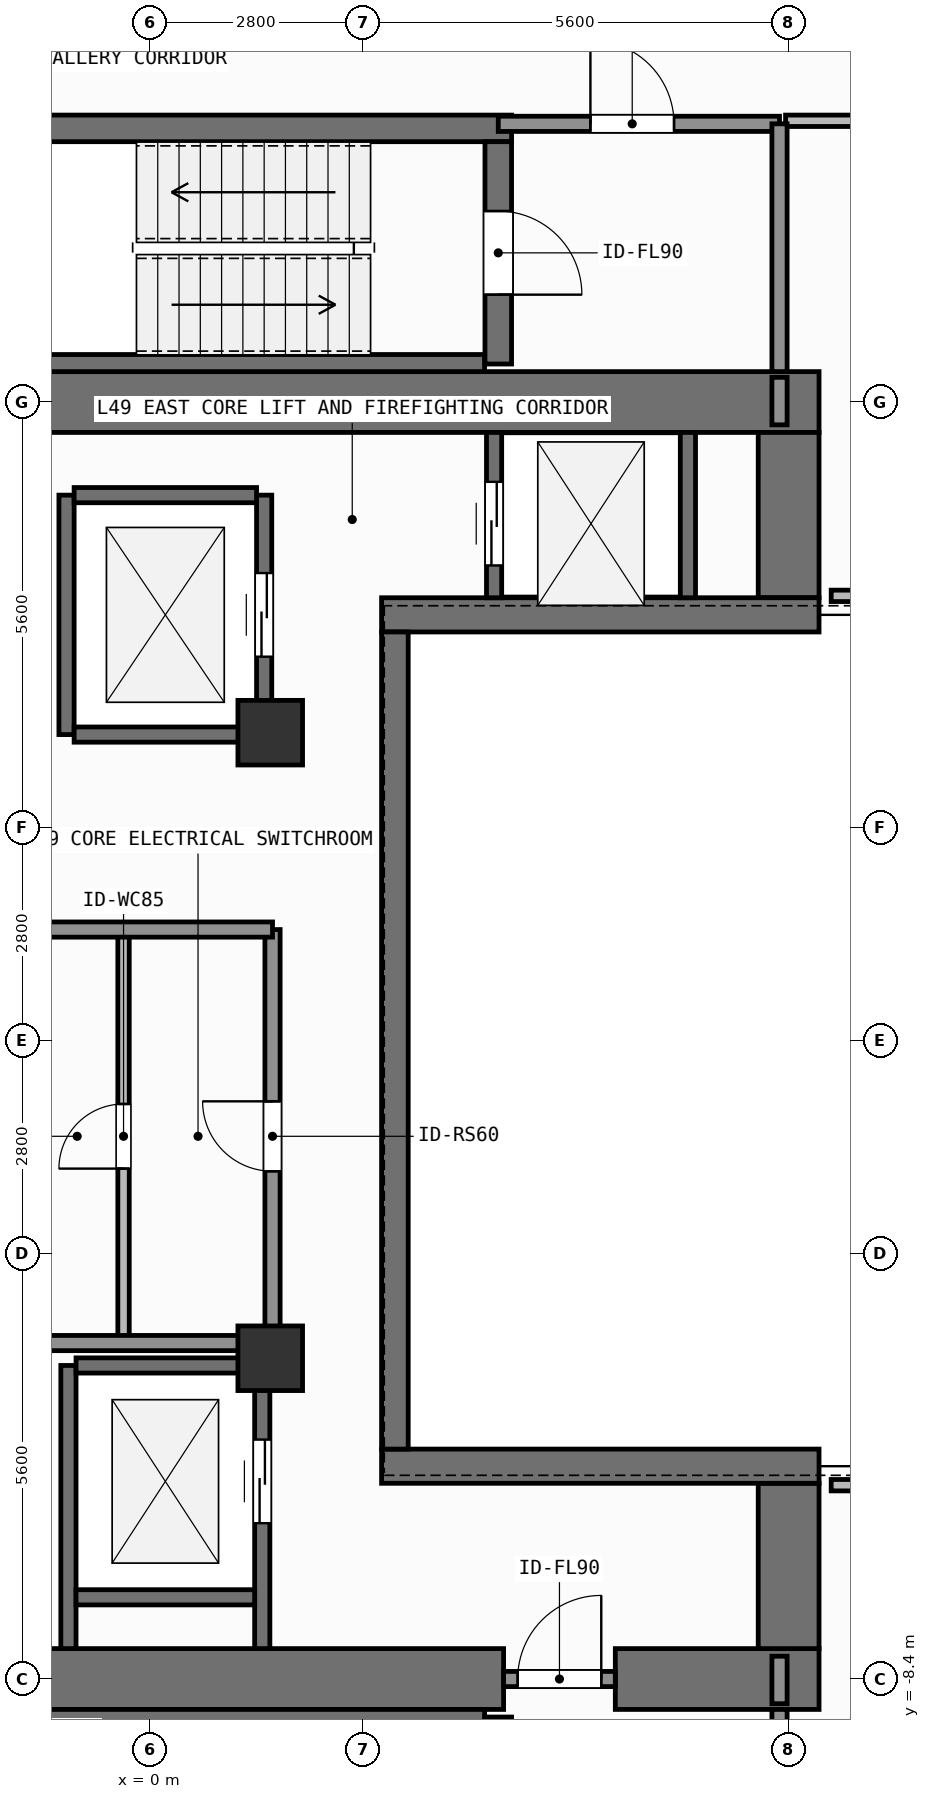
"""IFC4 building model, lengths in metres.
Left out: names, types, materials, properties, quantities, classifications, styles, units other than length and angle.
Written with IfcOpenShell. Run it as: python <this file> out.ifc"""

import sys

from ifc_helpers import new_model, si_unit, direction, frame, frame_2d, origin, origin_2d, place, context, subcontext, project, spatial, rectangle, extrude, element, fill, save


model = new_model("IFC4")
c1 = context("Model", 3, precision=1e-05, world=origin(), true_north=direction((0.0, 1.0)))
c2 = subcontext(c1, "Body", "Model", "MODEL_VIEW")
j1 = project(units=[si_unit("LENGTHUNIT", "METRE"), si_unit("PLANEANGLEUNIT", "RADIAN")], contexts=[c1])
p1 = place(None, origin())
s1 = spatial("IfcSite", under=j1, at=p1, CompositionType="ELEMENT")
p2 = place(p1, origin())
s2 = spatial("IfcBuilding", under=s1, at=p2, CompositionType="ELEMENT")
p3 = place(p2, frame((0.0, 0.0, 199.2)))
s3 = spatial("IfcBuildingStorey", under=s2, at=p3, CompositionType="ELEMENT", Elevation=199.2)
p4 = place(p3, frame((-2.62, -8.4, 0.0), z_axis=(0.0, 0.0, 1.0), x_axis=(1.0, 0.0, 0.0)))
e1 = element("IfcWall", 1, at=p4, inside=s3, PredefinedType="SHEAR", context=c2, shape_type="SweptSolid", body=[
    extrude(rectangle(XDim=7.27, YDim=0.8, at=frame_2d((3.635, 0.0))), origin(), (0.0, 0.0, 1.0), 3.9),
])
p5 = place(p3, frame((6.12, -8.4, 0.0), z_axis=(0.0, 0.0, 1.0), x_axis=(1.0, 0.0, 0.0)))
e2 = element("IfcWall", 2, at=p5, inside=s3, PredefinedType="SHEAR", context=c2, shape_type="SweptSolid", body=[
    extrude(rectangle(XDim=2.68, YDim=0.8, at=frame_2d((1.34, 0.0))), origin(), (0.0, 0.0, 1.0), 3.9),
])
p6 = place(p3, frame((-7.55, 8.4, 0.0), z_axis=(0.0, 0.0, 1.0), x_axis=(1.0, 0.0, 0.0)))
e3 = element("IfcWall", 3, at=p6, inside=s3, PredefinedType="SHEAR", context=c2, shape_type="SweptSolid", body=[
    extrude(rectangle(XDim=16.35, YDim=0.8, at=frame_2d((8.175, 0.0))), origin(), (0.0, 0.0, 1.0), 3.9),
])
for number, where, z_axis, x_axis in (
    (4, (8.4, -8.0, 0.0), (0.0, 0.0, 1.0), (0.0, 1.0, 0.0)),
    (5, (8.4, 5.825, 0.0), (0.0, 0.0, 1.0), (0.0, 1.0, 0.0)),
):
    element("IfcWall", number, at=place(p3, frame(where, z_axis=z_axis, x_axis=x_axis)), inside=s3, PredefinedType="SHEAR", context=c2, shape_type="SweptSolid", body=[
        extrude(rectangle(XDim=2.175, YDim=0.8, at=frame_2d((1.087, 0.0))), origin(), (0.0, 0.0, 1.0), 3.9),
    ])
for number, where, z_axis, x_axis in (
    (6, (3.045, -5.6, 0.0), (0.0, 0.0, 1.0), (1.0, 0.0, 0.0)),
    (7, (3.045, 5.6, 0.0), (0.0, 0.0, 1.0), (1.0, 0.0, 0.0)),
):
    element("IfcWall", number, at=place(p3, frame(where, z_axis=z_axis, x_axis=x_axis)), inside=s3, PredefinedType="SHEAR", context=c2, shape_type="SweptSolid", body=[
        extrude(rectangle(XDim=5.755, YDim=0.45, at=frame_2d((2.877, 0.0))), origin(), (0.0, 0.0, 1.0), 3.9),
    ])
p7 = place(p3, frame((3.22, -5.375, 0.0), z_axis=(0.0, 0.0, 1.0), x_axis=(0.0, 1.0, 0.0)))
e8 = element("IfcWall", 8, at=p7, inside=s3, PredefinedType="SHEAR", context=c2, shape_type="SweptSolid", body=[
    extrude(rectangle(XDim=10.75, YDim=0.35, at=frame_2d((5.375, 0.0))), origin(), (0.0, 0.0, 1.0), 3.9),
])
p8 = place(p3, frame((-2.2, -8.913, 0.0), z_axis=(0.0, 0.0, 1.0), x_axis=(1.0, 0.0, 0.0)))
e9 = element("IfcWall", 9, at=p8, inside=s3, PredefinedType="SHEAR", context=c2, shape_type="SweptSolid", body=[
    extrude(rectangle(XDim=6.6, YDim=0.225, at=frame_2d((3.3, 0.0))), origin(), (0.0, 0.0, 1.0), 3.9),
])
p9 = place(p3, frame((4.58, -8.9, 0.0), z_axis=(0.0, 0.0, 1.0), x_axis=(0.0, -1.0, 0.0)))
e10 = element("IfcWall", 10, at=p9, inside=s3, PredefinedType="SHEAR", context=c2, shape_type="SweptSolid", body=[
    extrude(rectangle(XDim=2.925, YDim=0.35, at=frame_2d((1.462, 0.0))), origin(), (0.0, 0.0, 1.0), 3.9),
])
p10 = place(p9, frame((0.913, 0.0, 0.0)))
e11 = element("IfcOpeningElement", 11, at=p10, cuts=e10, PredefinedType="OPENING", context=c2, shape_type="SweptSolid", body=[
    extrude(rectangle(XDim=1.1, YDim=2.15, at=frame_2d((0.55, 1.075))), frame((0.0, 0.185, 0.0), z_axis=(0.0, -1.0, 0.0), x_axis=(1.0, 0.0, 0.0)), (0.0, 0.0, 1.0), 0.37),
])
p11 = place(p3, frame((-2.555, 12.0, 0.0), z_axis=(0.0, 0.0, 1.0), x_axis=(1.0, 0.0, 0.0)))
e12 = element("IfcWall", 12, at=p11, inside=s3, PredefinedType="SHEAR", context=c2, shape_type="SweptSolid", body=[
    extrude(rectangle(XDim=7.31, YDim=0.35, at=frame_2d((3.655, 0.0))), origin(), (0.0, 0.0, 1.0), 3.9),
])
p12 = place(p3, frame((-2.2, 8.913, 0.0), z_axis=(0.0, 0.0, 1.0), x_axis=(1.0, 0.0, 0.0)))
e13 = element("IfcWall", 13, at=p12, inside=s3, PredefinedType="SHEAR", context=c2, shape_type="SweptSolid", body=[
    extrude(rectangle(XDim=6.6, YDim=0.225, at=frame_2d((3.3, 0.0))), origin(), (0.0, 0.0, 1.0), 3.9),
])
p13 = place(p3, frame((4.58, 11.825, 0.0), z_axis=(0.0, 0.0, 1.0), x_axis=(0.0, -1.0, 0.0)))
e14 = element("IfcWall", 14, at=p13, inside=s3, PredefinedType="SHEAR", context=c2, shape_type="SweptSolid", body=[
    extrude(rectangle(XDim=2.925, YDim=0.35, at=frame_2d((1.462, 0.0))), origin(), (0.0, 0.0, 1.0), 3.9),
])
p14 = place(p13, frame((0.913, 0.0, 0.0)))
e15 = element("IfcOpeningElement", 15, at=p14, cuts=e14, PredefinedType="OPENING", context=c2, shape_type="SweptSolid", body=[
    extrude(rectangle(XDim=1.1, YDim=2.15, at=frame_2d((0.55, 1.075))), frame((0.0, 0.185, 0.0), z_axis=(0.0, -1.0, 0.0), x_axis=(1.0, 0.0, 0.0)), (0.0, 0.0, 1.0), 0.37),
])
for number, where, z_axis, x_axis in (
    (16, (1.58, -4.18, 0.0), (0.0, 0.0, 1.0), (1.0, 0.0, 0.0)),
    (17, (1.58, 4.05, 0.0), (0.0, 0.0, 1.0), (1.0, 0.0, 0.0)),
):
    element("IfcColumn", number, at=place(p3, frame(where, z_axis=z_axis, x_axis=x_axis)), inside=s3, PredefinedType="COLUMN", context=c2, shape_type="SweptSolid", body=[
        extrude(rectangle(XDim=0.85, YDim=0.85, at=origin_2d()), origin(), (0.0, 0.0, 1.0), 3.9),
    ])
p15 = place(p3, frame((-1.1, 4.025, 0.0), z_axis=(0.0, 0.0, 1.0), x_axis=(0.0, 1.0, 0.0)))
e18 = element("IfcWall", 18, at=p15, inside=s3, PredefinedType="SHEAR", context=c2, shape_type="SweptSolid", body=[
    extrude(rectangle(XDim=3.15, YDim=0.2, at=frame_2d((1.575, 0.0))), origin(), (0.0, 0.0, 1.0), 3.68),
])
p16 = place(p3, frame((1.5, 4.025, 0.0), z_axis=(0.0, 0.0, 1.0), x_axis=(0.0, 1.0, 0.0)))
e19 = element("IfcWall", 19, at=p16, inside=s3, PredefinedType="SHEAR", context=c2, shape_type="SweptSolid", body=[
    extrude(rectangle(XDim=3.15, YDim=0.2, at=frame_2d((1.575, 0.0))), origin(), (0.0, 0.0, 1.0), 3.68),
])
p17 = place(p16, frame((1.025, 0.0, 0.0)))
e20 = element("IfcOpeningElement", 20, at=p17, cuts=e19, PredefinedType="OPENING", context=c2, shape_type="SweptSolid", body=[
    extrude(rectangle(XDim=1.1, YDim=2.2, at=frame_2d((0.55, 1.1))), frame((0.0, 0.11, 0.0), z_axis=(0.0, -1.0, 0.0), x_axis=(1.0, 0.0, 0.0)), (0.0, 0.0, 1.0), 0.22),
])
for number, where, z_axis, x_axis in (
    (21, (-1.0, 4.025, 0.0), (0.0, 0.0, 1.0), (1.0, 0.0, 0.0)),
    (22, (-1.0, 7.175, 0.0), (0.0, 0.0, 1.0), (1.0, 0.0, 0.0)),
):
    element("IfcWall", number, at=place(p3, frame(where, z_axis=z_axis, x_axis=x_axis)), inside=s3, PredefinedType="SHEAR", context=c2, shape_type="SweptSolid", body=[
        extrude(rectangle(XDim=2.4, YDim=0.2, at=frame_2d((1.2, 0.0))), origin(), (0.0, 0.0, 1.0), 3.68),
    ])
p18 = place(p3, frame((-1.075, -8.0, 0.0), z_axis=(0.0, 0.0, 1.0), x_axis=(0.0, 1.0, 0.0)))
e23 = element("IfcWall", 23, at=p18, inside=s3, PredefinedType="SHEAR", context=c2, shape_type="SweptSolid", body=[
    extrude(rectangle(XDim=3.725, YDim=0.2, at=frame_2d((1.863, 0.0))), origin(), (0.0, 0.0, 1.0), 3.68),
])
p19 = place(p3, frame((1.475, -8.0, 0.0), z_axis=(0.0, 0.0, 1.0), x_axis=(0.0, 1.0, 0.0)))
e24 = element("IfcWall", 24, at=p19, inside=s3, PredefinedType="SHEAR", context=c2, shape_type="SweptSolid", body=[
    extrude(rectangle(XDim=3.725, YDim=0.2, at=frame_2d((1.863, 0.0))), origin(), (0.0, 0.0, 1.0), 3.68),
])
p20 = place(p19, frame((1.65, 0.0, 0.0)))
e25 = element("IfcOpeningElement", 25, at=p20, cuts=e24, PredefinedType="OPENING", context=c2, shape_type="SweptSolid", body=[
    extrude(rectangle(XDim=1.1, YDim=2.2, at=frame_2d((0.55, 1.1))), frame((0.0, 0.11, 0.0), z_axis=(0.0, -1.0, 0.0), x_axis=(1.0, 0.0, 0.0)), (0.0, 0.0, 1.0), 0.22),
])
for number, where, z_axis, x_axis in (
    (26, (-0.975, -7.325, 0.0), (0.0, 0.0, 1.0), (1.0, 0.0, 0.0)),
    (27, (-0.975, -4.275, 0.0), (0.0, 0.0, 1.0), (1.0, 0.0, 0.0)),
):
    element("IfcWall", number, at=place(p3, frame(where, z_axis=z_axis, x_axis=x_axis)), inside=s3, PredefinedType="SHEAR", context=c2, shape_type="SweptSolid", body=[
        extrude(rectangle(XDim=2.35, YDim=0.2, at=frame_2d((1.175, 0.0))), origin(), (0.0, 0.0, 1.0), 3.68),
    ])
p21 = place(p3, frame((4.525, 5.825, 0.0), z_axis=(0.0, 0.0, 1.0), x_axis=(0.0, 1.0, 0.0)))
e28 = element("IfcWall", 28, at=p21, inside=s3, PredefinedType="SHEAR", context=c2, shape_type="SweptSolid", body=[
    extrude(rectangle(XDim=2.175, YDim=0.2, at=frame_2d((1.087, 0.0))), origin(), (0.0, 0.0, 1.0), 3.68),
])
p22 = place(p21, frame((0.425, 0.0, 0.0)))
e29 = element("IfcOpeningElement", 29, at=p22, cuts=e28, PredefinedType="OPENING", context=c2, shape_type="SweptSolid", body=[
    extrude(rectangle(XDim=1.1, YDim=2.2, at=frame_2d((0.55, 1.1))), frame((0.0, 0.11, 0.0), z_axis=(0.0, -1.0, 0.0), x_axis=(1.0, 0.0, 0.0)), (0.0, 0.0, 1.0), 0.22),
])
p23 = place(p3, frame((7.075, 5.825, 0.0), z_axis=(0.0, 0.0, 1.0), x_axis=(0.0, 1.0, 0.0)))
e30 = element("IfcWall", 30, at=p23, inside=s3, PredefinedType="SHEAR", context=c2, shape_type="SweptSolid", body=[
    extrude(rectangle(XDim=2.175, YDim=0.2, at=frame_2d((1.087, 0.0))), origin(), (0.0, 0.0, 1.0), 3.68),
])
p24 = place(p3, frame((4.65, -8.4, 0.0), z_axis=(0.0, 0.0, 1.0), x_axis=(1.0, 0.0, 0.0)))
e31 = element("IfcWall", 31, at=p24, inside=s3, PredefinedType="SOLIDWALL", context=c2, shape_type="SweptSolid", body=[
    extrude(rectangle(XDim=1.47, YDim=0.2, at=frame_2d((0.735, 0.0))), origin(), (0.0, 0.0, 1.0), 2.82),
])
p25 = place(p24, frame((0.185, 0.0, 0.0)))
e32 = element("IfcOpeningElement", 32, at=p25, cuts=e31, PredefinedType="OPENING", context=c2, shape_type="SweptSolid", body=[
    extrude(rectangle(XDim=1.1, YDim=2.15, at=frame_2d((0.55, 1.075))), frame((0.0, 0.11, 0.0), z_axis=(0.0, -1.0, 0.0), x_axis=(1.0, 0.0, 0.0)), (0.0, 0.0, 1.0), 0.22),
])
p26 = place(p3, frame((4.58, 12.06, 0.0), z_axis=(0.0, 0.0, 1.0), x_axis=(1.0, 0.0, 0.0)))
e33 = element("IfcWall", 33, at=p26, inside=s3, PredefinedType="SOLIDWALL", context=c2, shape_type="SweptSolid", body=[
    extrude(rectangle(XDim=3.7, YDim=0.2, at=frame_2d((1.85, 0.0))), origin(), (0.0, 0.0, 1.0), 3.68),
])
p27 = place(p26, frame((1.212, 0.0, 0.0)))
e34 = element("IfcOpeningElement", 34, at=p27, cuts=e33, PredefinedType="OPENING", context=c2, shape_type="SweptSolid", body=[
    extrude(rectangle(XDim=1.1, YDim=2.15, at=frame_2d((0.55, 1.075))), frame((0.0, 0.11, 0.0), z_axis=(0.0, -1.0, 0.0), x_axis=(1.0, 0.0, 0.0)), (0.0, 0.0, 1.0), 0.22),
])
p28 = place(p3, frame((-0.35, -3.98, 0.0), z_axis=(0.0, 0.0, 1.0), x_axis=(0.0, 1.0, 0.0)))
e35 = element("IfcWall", 35, at=p28, inside=s3, PredefinedType="PARTITIONING", context=c2, shape_type="SweptSolid", body=[
    extrude(rectangle(XDim=5.44, YDim=0.15, at=frame_2d((2.72, 0.0))), origin(), (0.0, 0.0, 1.0), 3.68),
])
p29 = place(p28, frame((2.295, 0.0, 0.0)))
e36 = element("IfcOpeningElement", 36, at=p29, cuts=e35, PredefinedType="OPENING", context=c2, shape_type="SweptSolid", body=[
    extrude(rectangle(XDim=0.85, YDim=2.1, at=frame_2d((0.425, 1.05))), frame((0.0, 0.085, 0.0), z_axis=(0.0, -1.0, 0.0), x_axis=(1.0, 0.0, 0.0)), (0.0, 0.0, 1.0), 0.17),
])
p30 = place(p3, frame((1.61, -3.98, 0.0), z_axis=(0.0, 0.0, 1.0), x_axis=(0.0, 1.0, 0.0)))
e37 = element("IfcWall", 37, at=p30, inside=s3, PredefinedType="SOLIDWALL", context=c2, shape_type="SweptSolid", body=[
    extrude(rectangle(XDim=5.44, YDim=0.2, at=frame_2d((2.72, 0.0))), origin(), (0.0, 0.0, 1.0), 3.68),
])
p31 = place(p30, frame((2.26, 0.0, 0.0)))
e38 = element("IfcOpeningElement", 38, at=p31, cuts=e37, PredefinedType="OPENING", context=c2, shape_type="SweptSolid", body=[
    extrude(rectangle(XDim=0.92, YDim=2.1, at=frame_2d((0.46, 1.05))), frame((0.0, 0.11, 0.0), z_axis=(0.0, -1.0, 0.0), x_axis=(1.0, 0.0, 0.0)), (0.0, 0.0, 1.0), 0.22),
])
p32 = place(p3, frame((8.36, 12.1, 0.0), z_axis=(0.0, 0.0, 1.0), x_axis=(1.0, 0.0, 0.0)))
e39 = element("IfcWall", 39, at=p32, inside=s3, PredefinedType="PARTITIONING", context=c2, shape_type="SweptSolid", body=[
    extrude(rectangle(XDim=7.22, YDim=0.15, at=frame_2d((3.61, 0.0))), origin(), (0.0, 0.0, 1.0), 3.68),
])
p33 = place(p32, frame((3.513, 0.0, 0.0)))
e40 = element("IfcOpeningElement", 40, at=p33, cuts=e39, PredefinedType="OPENING", context=c2, shape_type="SweptSolid", body=[
    extrude(rectangle(XDim=0.9, YDim=2.1, at=frame_2d((0.45, 1.05))), frame((0.0, 0.085, 0.0), z_axis=(0.0, -1.0, 0.0), x_axis=(1.0, 0.0, 0.0)), (0.0, 0.0, 1.0), 0.17),
])
for number, where, z_axis, x_axis in (
    (41, (8.28, -12.06, 0.0), (0.0, 0.0, 1.0), (0.0, 1.0, 0.0)),
    (42, (8.28, 8.8, 0.0), (0.0, 0.0, 1.0), (0.0, 1.0, 0.0)),
):
    element("IfcWall", number, at=place(p3, frame(where, z_axis=z_axis, x_axis=x_axis)), inside=s3, PredefinedType="SOLIDWALL", context=c2, shape_type="SweptSolid", body=[
        extrude(rectangle(XDim=3.26, YDim=0.2, at=frame_2d((1.63, 0.0))), origin(), (0.0, 0.0, 1.0), 3.68),
    ])
for number, where, z_axis, x_axis in (
    (43, (-1.58, -3.98, 0.0), (0.0, 0.0, 1.0), (1.0, 0.0, 0.0)),
    (44, (-1.58, 1.46, 0.0), (0.0, 0.0, 1.0), (1.0, 0.0, 0.0)),
):
    element("IfcWall", number, at=place(p3, frame(where, z_axis=z_axis, x_axis=x_axis)), inside=s3, PredefinedType="SOLIDWALL", context=c2, shape_type="SweptSolid", body=[
        extrude(rectangle(XDim=3.19, YDim=0.2, at=frame_2d((1.595, 0.0))), origin(), (0.0, 0.0, 1.0), 3.68),
    ])
p34 = place(p3, frame((8.28, -8.725, 0.0), z_axis=(0.0, 0.0, 1.0), x_axis=(0.0, 1.0, 0.0)))
e45 = element("IfcWall", 45, at=p34, inside=s3, PredefinedType="SOLIDWALL", context=c2, shape_type="SweptSolid", body=[
    extrude(rectangle(XDim=0.625, YDim=0.2, at=frame_2d((0.312, 0.0))), origin(), (0.0, 0.0, 1.0), 3.68),
])
p35 = place(p3, frame((8.96, -5.85, 0.0), z_axis=(0.0, 0.0, 1.0), x_axis=(1.0, 0.0, 0.0)))
e46 = element("IfcWall", 46, at=p35, inside=s3, PredefinedType="PARTITIONING", context=c2, shape_type="SweptSolid", body=[
    extrude(rectangle(XDim=6.62, YDim=0.15, at=frame_2d((3.31, 0.0))), origin(), (0.0, 0.0, 1.0), 3.68),
])
p36 = place(p3, frame((8.28, 8.1, 0.0), z_axis=(0.0, 0.0, 1.0), x_axis=(0.0, 1.0, 0.0)))
e47 = element("IfcWall", 47, at=p36, inside=s3, PredefinedType="SOLIDWALL", context=c2, shape_type="SweptSolid", body=[
    extrude(rectangle(XDim=0.625, YDim=0.2, at=frame_2d((0.312, 0.0))), origin(), (0.0, 0.0, 1.0), 3.68),
])
p37 = place(p3, frame((8.96, 5.85, 0.0), z_axis=(0.0, 0.0, 1.0), x_axis=(1.0, 0.0, 0.0)))
e48 = element("IfcWall", 48, at=p37, inside=s3, PredefinedType="PARTITIONING", context=c2, shape_type="SweptSolid", body=[
    extrude(rectangle(XDim=6.62, YDim=0.15, at=frame_2d((3.31, 0.0))), origin(), (0.0, 0.0, 1.0), 3.68),
])
p38 = place(p17, origin())
e49 = element("IfcDoor", 49, at=p38, inside=s3, OperationType="SLIDING_TO_LEFT", PredefinedType="DOOR", context=c2, shape_type="SweptSolid", body=[
    extrude(rectangle(XDim=1.1, YDim=2.2, at=frame_2d((0.55, 1.1))), frame((0.0, 0.025, 0.0), z_axis=(0.0, -1.0, 0.0), x_axis=(1.0, 0.0, 0.0)), (0.0, 0.0, 1.0), 0.05),
])
fill(e20, e49)
p39 = place(p20, origin())
e50 = element("IfcDoor", 50, at=p39, inside=s3, OperationType="SLIDING_TO_LEFT", PredefinedType="DOOR", context=c2, shape_type="SweptSolid", body=[
    extrude(rectangle(XDim=1.1, YDim=2.2, at=frame_2d((0.55, 1.1))), frame((0.0, 0.025, 0.0), z_axis=(0.0, -1.0, 0.0), x_axis=(1.0, 0.0, 0.0)), (0.0, 0.0, 1.0), 0.05),
])
fill(e25, e50)
p40 = place(p22, origin())
e51 = element("IfcDoor", 51, at=p40, inside=s3, OperationType="SLIDING_TO_LEFT", PredefinedType="DOOR", context=c2, shape_type="SweptSolid", body=[
    extrude(rectangle(XDim=1.1, YDim=2.2, at=frame_2d((0.55, 1.1))), frame((0.0, 0.025, 0.0), z_axis=(0.0, -1.0, 0.0), x_axis=(1.0, 0.0, 0.0)), (0.0, 0.0, 1.0), 0.05),
])
fill(e29, e51)
p41 = place(p14, origin())
e52 = element("IfcDoor", 52, at=p41, inside=s3, OperationType="SINGLE_SWING_RIGHT", PredefinedType="DOOR", context=c2, shape_type="SweptSolid", body=[
    extrude(rectangle(XDim=1.1, YDim=2.15, at=frame_2d((0.55, 1.075))), frame((0.0, 0.025, 0.0), z_axis=(0.0, -1.0, 0.0), x_axis=(1.0, 0.0, 0.0)), (0.0, 0.0, 1.0), 0.05),
])
fill(e15, e52)
p42 = place(p25, origin())
e53 = element("IfcDoor", 53, at=p42, inside=s3, OperationType="SINGLE_SWING_RIGHT", PredefinedType="DOOR", context=c2, shape_type="SweptSolid", body=[
    extrude(rectangle(XDim=1.1, YDim=2.15, at=frame_2d((0.55, 1.075))), frame((0.0, 0.025, 0.0), z_axis=(0.0, -1.0, 0.0), x_axis=(1.0, 0.0, 0.0)), (0.0, 0.0, 1.0), 0.05),
])
fill(e32, e53)
p43 = place(p27, origin())
e54 = element("IfcDoor", 54, at=p43, inside=s3, OperationType="SINGLE_SWING_LEFT", PredefinedType="DOOR", context=c2, shape_type="SweptSolid", body=[
    extrude(rectangle(XDim=1.1, YDim=2.15, at=frame_2d((0.55, 1.075))), frame((0.0, 0.025, 0.0), z_axis=(0.0, -1.0, 0.0), x_axis=(1.0, 0.0, 0.0)), (0.0, 0.0, 1.0), 0.05),
])
fill(e34, e54)
p44 = place(p29, origin())
e55 = element("IfcDoor", 55, at=p44, inside=s3, OperationType="SINGLE_SWING_LEFT", PredefinedType="DOOR", context=c2, shape_type="SweptSolid", body=[
    extrude(rectangle(XDim=0.85, YDim=2.1, at=frame_2d((0.425, 1.05))), frame((0.0, 0.025, 0.0), z_axis=(0.0, -1.0, 0.0), x_axis=(1.0, 0.0, 0.0)), (0.0, 0.0, 1.0), 0.05),
])
fill(e36, e55)
p45 = place(p31, origin())
e56 = element("IfcDoor", 56, at=p45, inside=s3, OperationType="SINGLE_SWING_RIGHT", PredefinedType="DOOR", context=c2, shape_type="SweptSolid", body=[
    extrude(rectangle(XDim=0.92, YDim=2.1, at=frame_2d((0.46, 1.05))), frame((0.0, 0.025, 0.0), z_axis=(0.0, -1.0, 0.0), x_axis=(1.0, 0.0, 0.0)), (0.0, 0.0, 1.0), 0.05),
])
fill(e38, e56)
save(model, sys.argv[1])
